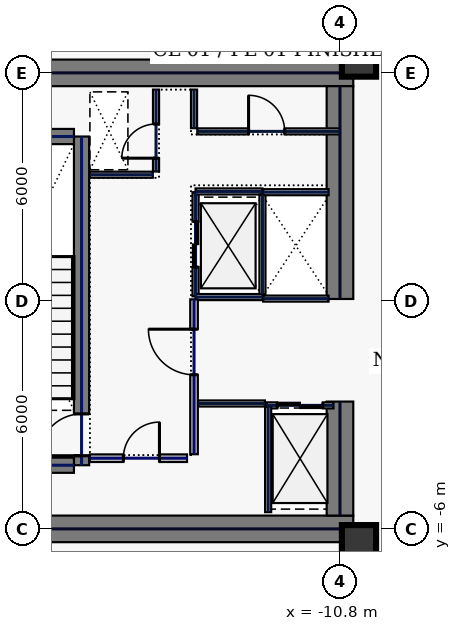
"""IFC4 building model, lengths in metres.
Left out: names, types, materials, properties, quantities, classifications, styles, units other than length and angle.
Written with IfcOpenShell. Run it as: python <this file> out.ifc"""

import sys

from ifc_helpers import new_model, si_unit, direction, frame, frame_2d, origin, origin_2d, place, context, subcontext, project, spatial, rectangle, hollow_rectangle, extrude, element, fill, save


model = new_model("IFC4")
c1 = context("Model", 3, precision=1e-05, world=origin(), true_north=direction((0.0, 1.0)))
c2 = subcontext(c1, "Body", "Model", "MODEL_VIEW")
j1 = project(units=[si_unit("LENGTHUNIT", "METRE"), si_unit("PLANEANGLEUNIT", "RADIAN")], contexts=[c1])
p1 = place(None, origin())
s1 = spatial("IfcSite", under=j1, at=p1, CompositionType="ELEMENT")
p2 = place(p1, origin())
s2 = spatial("IfcBuilding", under=s1, at=p2, CompositionType="ELEMENT")
p3 = place(p2, frame((0.0, 0.0, 160.2)))
s3 = spatial("IfcBuildingStorey", under=s2, at=p3, CompositionType="ELEMENT", Elevation=160.2)
for number, where, z_axis, x_axis in (
    (1, (-22.0, 6.0, 0.0), (0.0, 0.0, 1.0), (1.0, 0.0, 0.0)),
    (2, (-22.0, -6.0, 0.0), (0.0, 0.0, 1.0), (1.0, 0.0, 0.0)),
):
    element("IfcWall", number, at=place(p3, frame(where, z_axis=z_axis, x_axis=x_axis)), inside=s3, PredefinedType="SHEAR", context=c2, shape_type="SweptSolid", body=[
        extrude(rectangle(XDim=11.55, YDim=0.7, at=frame_2d((5.775, 0.0))), origin(), (0.0, 0.0, 1.0), 3.74),
    ])
p4 = place(p3, frame((-10.8, -5.65, 0.0), z_axis=(0.0, 0.0, 1.0), x_axis=(0.0, 1.0, 0.0)))
e3 = element("IfcWall", 3, at=p4, inside=s3, PredefinedType="SHEAR", context=c2, shape_type="SweptSolid", body=[
    extrude(rectangle(XDim=3.0, YDim=0.7, at=frame_2d((1.5, 0.0))), origin(), (0.0, 0.0, 1.0), 3.74),
])
p5 = place(p3, frame((-10.8, 0.05, 0.0), z_axis=(0.0, 0.0, 1.0), x_axis=(0.0, 1.0, 0.0)))
e4 = element("IfcWall", 4, at=p5, inside=s3, PredefinedType="SHEAR", context=c2, shape_type="SweptSolid", body=[
    extrude(rectangle(XDim=5.6, YDim=0.7, at=frame_2d((2.8, 0.0))), origin(), (0.0, 0.0, 1.0), 3.74),
])
p6 = place(p3, frame((-17.6, -4.325, 0.0), z_axis=(0.0, 0.0, 1.0), x_axis=(0.0, 1.0, 0.0)))
e5 = element("IfcWall", 5, at=p6, inside=s3, PredefinedType="SHEAR", context=c2, shape_type="SweptSolid", body=[
    extrude(rectangle(XDim=8.65, YDim=0.4, at=frame_2d((4.325, 0.0))), origin(), (0.0, 0.0, 1.0), 3.74),
])
p7 = place(p6, frame((0.25, 0.0, 0.0)))
e6 = element("IfcOpeningElement", 6, at=p7, cuts=e5, PredefinedType="OPENING", context=c2, shape_type="SweptSolid", body=[
    extrude(rectangle(XDim=1.1, YDim=2.2, at=frame_2d((0.55, 1.1))), frame((0.0, 0.21, 0.0), z_axis=(0.0, -1.0, 0.0), x_axis=(1.0, 0.0, 0.0)), (0.0, 0.0, 1.0), 0.42),
])
for number, where, z_axis, x_axis in (
    (7, (-21.2, -4.325, 0.0), (0.0, 0.0, 1.0), (1.0, 0.0, 0.0)),
    (8, (-21.2, 4.325, 0.0), (0.0, 0.0, 1.0), (1.0, 0.0, 0.0)),
):
    element("IfcWall", number, at=place(p3, frame(where, z_axis=z_axis, x_axis=x_axis)), inside=s3, PredefinedType="SHEAR", context=c2, shape_type="SweptSolid", body=[
        extrude(rectangle(XDim=3.4, YDim=0.4, at=frame_2d((1.7, 0.0))), origin(), (0.0, 0.0, 1.0), 3.74),
    ])
for number, where, z_axis, x_axis in (
    (9, (-10.3, -6.35, 0.0), (0.0, 0.0, 1.0), (1.0, 0.0, 0.0)),
    (10, (-10.3, 6.35, 0.0), (0.0, 0.0, 1.0), (1.0, 0.0, 0.0)),
):
    element("IfcColumn", number, at=place(p3, frame(where, z_axis=z_axis, x_axis=x_axis)), inside=s3, PredefinedType="COLUMN", context=c2, shape_type="SweptSolid", body=[
        extrude(hollow_rectangle(XDim=0.9, YDim=0.9, WallThickness=0.04, at=origin_2d()), origin(), (0.0, 0.0, 1.0), 3.74),
    ])
p8 = place(p3, frame((-14.6, 0.12, 0.0), z_axis=(0.0, 0.0, 1.0), x_axis=(0.0, 1.0, 0.0)))
e11 = element("IfcWall", 11, at=p8, inside=s3, PredefinedType="PARTITIONING", context=c2, shape_type="SweptSolid", body=[
    extrude(rectangle(XDim=2.74, YDim=0.16, at=frame_2d((1.37, 0.0))), origin(), (0.0, 0.0, 1.0), 3.74),
])
p9 = place(p8, frame((0.77, 0.0, 0.0)))
e12 = element("IfcOpeningElement", 12, at=p9, cuts=e11, PredefinedType="OPENING", context=c2, shape_type="SweptSolid", body=[
    extrude(rectangle(XDim=1.2, YDim=2.2, at=frame_2d((0.6, 1.1))), frame((0.0, 0.09, 0.0), z_axis=(0.0, -1.0, 0.0), x_axis=(1.0, 0.0, 0.0)), (0.0, 0.0, 1.0), 0.18),
])
for number, where, z_axis, x_axis in (
    (13, (-14.6, 0.1, 0.0), (0.0, 0.0, 1.0), (1.0, 0.0, 0.0)),
    (14, (-14.6, 2.88, 0.0), (0.0, 0.0, 1.0), (1.0, 0.0, 0.0)),
):
    element("IfcWall", number, at=place(p3, frame(where, z_axis=z_axis, x_axis=x_axis)), inside=s3, PredefinedType="PARTITIONING", context=c2, shape_type="SweptSolid", body=[
        extrude(rectangle(XDim=1.76, YDim=0.16, at=frame_2d((0.88, 0.0))), origin(), (0.0, 0.0, 1.0), 3.74),
    ])
p10 = place(p3, frame((-12.84, 0.18, 0.0), z_axis=(0.0, 0.0, 1.0), x_axis=(0.0, 1.0, 0.0)))
e15 = element("IfcWall", 15, at=p10, inside=s3, PredefinedType="PARTITIONING", context=c2, shape_type="SweptSolid", body=[
    extrude(rectangle(XDim=2.62, YDim=0.16, at=frame_2d((1.31, 0.0))), origin(), (0.0, 0.0, 1.0), 3.74),
])
p11 = place(p3, frame((-12.73, -2.75, 0.0), z_axis=(0.0, 0.0, 1.0), x_axis=(1.0, 0.0, 0.0)))
e16 = element("IfcWall", 16, at=p11, inside=s3, PredefinedType="PARTITIONING", context=c2, shape_type="SweptSolid", body=[
    extrude(rectangle(XDim=1.76, YDim=0.16, at=frame_2d((0.88, 0.0))), origin(), (0.0, 0.0, 1.0), 3.74),
])
p12 = place(p11, frame((0.28, 0.0, 0.0)))
e17 = element("IfcOpeningElement", 17, at=p12, cuts=e16, PredefinedType="OPENING", context=c2, shape_type="SweptSolid", body=[
    extrude(rectangle(XDim=1.2, YDim=2.2, at=frame_2d((0.6, 1.1))), frame((0.0, 0.09, 0.0), z_axis=(0.0, -1.0, 0.0), x_axis=(1.0, 0.0, 0.0)), (0.0, 0.0, 1.0), 0.18),
])
for number, where, z_axis, x_axis in (
    (18, (-12.82, 0.06, 0.0), (0.0, 0.0, 1.0), (1.0, 0.0, 0.0)),
    (19, (-12.82, 2.86, 0.0), (0.0, 0.0, 1.0), (1.0, 0.0, 0.0)),
):
    element("IfcWall", number, at=place(p3, frame(where, z_axis=z_axis, x_axis=x_axis)), inside=s3, PredefinedType="PARTITIONING", context=c2, shape_type="SweptSolid", body=[
        extrude(rectangle(XDim=1.72, YDim=0.16, at=frame_2d((0.86, 0.0))), origin(), (0.0, 0.0, 1.0), 3.74),
    ])
p13 = place(p3, frame((-15.64, 3.405, 0.0), z_axis=(0.0, 0.0, 1.0), x_axis=(0.0, 1.0, 0.0)))
e20 = element("IfcWall", 20, at=p13, inside=s3, PredefinedType="PARTITIONING", context=c2, shape_type="SweptSolid", body=[
    extrude(rectangle(XDim=2.155, YDim=0.16, at=frame_2d((1.078, 0.0))), origin(), (0.0, 0.0, 1.0), 3.74),
])
p14 = place(p13, frame((0.35, 0.0, 0.0)))
e21 = element("IfcOpeningElement", 21, at=p14, cuts=e20, PredefinedType="OPENING", context=c2, shape_type="SweptSolid", body=[
    extrude(rectangle(XDim=0.9, YDim=2.2, at=frame_2d((0.45, 1.1))), frame((0.0, 0.09, 0.0), z_axis=(0.0, -1.0, 0.0), x_axis=(1.0, 0.0, 0.0)), (0.0, 0.0, 1.0), 0.18),
])
p15 = place(p3, frame((-17.38, 3.32, 0.0), z_axis=(0.0, 0.0, 1.0), x_axis=(1.0, 0.0, 0.0)))
e22 = element("IfcWall", 22, at=p15, inside=s3, PredefinedType="PARTITIONING", context=c2, shape_type="SweptSolid", body=[
    extrude(rectangle(XDim=1.655, YDim=0.16, at=frame_2d((0.827, 0.0))), origin(), (0.0, 0.0, 1.0), 3.74),
])
p16 = place(p3, frame((-17.38, -4.14, 0.0), z_axis=(0.0, 0.0, 1.0), x_axis=(1.0, 0.0, 0.0)))
e23 = element("IfcWall", 23, at=p16, inside=s3, PredefinedType="SOLIDWALL", context=c2, shape_type="SweptSolid", body=[
    extrude(rectangle(XDim=2.555, YDim=0.2, at=frame_2d((1.277, 0.0))), origin(), (0.0, 0.0, 1.0), 3.74),
])
p17 = place(p16, frame((0.88, 0.0, 0.0)))
e24 = element("IfcOpeningElement", 24, at=p17, cuts=e23, PredefinedType="OPENING", context=c2, shape_type="SweptSolid", body=[
    extrude(rectangle(XDim=0.95, YDim=2.2, at=frame_2d((0.475, 1.1))), frame((0.0, 0.11, 0.0), z_axis=(0.0, -1.0, 0.0), x_axis=(1.0, 0.0, 0.0)), (0.0, 0.0, 1.0), 0.22),
])
p18 = place(p3, frame((-14.535, -2.7, 0.0), z_axis=(0.0, 0.0, 1.0), x_axis=(1.0, 0.0, 0.0)))
e25 = element("IfcWall", 25, at=p18, inside=s3, PredefinedType="PARTITIONING", context=c2, shape_type="SweptSolid", body=[
    extrude(rectangle(XDim=1.76, YDim=0.16, at=frame_2d((0.88, 0.0))), origin(), (0.0, 0.0, 1.0), 3.74),
])
p19 = place(p3, frame((-12.69, -5.56, 0.0), z_axis=(0.0, 0.0, 1.0), x_axis=(0.0, 1.0, 0.0)))
e26 = element("IfcWall", 26, at=p19, inside=s3, PredefinedType="PARTITIONING", context=c2, shape_type="SweptSolid", body=[
    extrude(rectangle(XDim=2.775, YDim=0.16, at=frame_2d((1.388, 0.0))), origin(), (0.0, 0.0, 1.0), 3.74),
])
p20 = place(p3, frame((-14.555, 4.46, 0.0), z_axis=(0.0, 0.0, 1.0), x_axis=(1.0, 0.0, 0.0)))
e27 = element("IfcWall", 27, at=p20, inside=s3, PredefinedType="PARTITIONING", context=c2, shape_type="SweptSolid", body=[
    extrude(rectangle(XDim=3.755, YDim=0.16, at=frame_2d((1.877, 0.0))), origin(), (0.0, 0.0, 1.0), 3.74),
])
p21 = place(p20, frame((1.35, 0.0, 0.0)))
e28 = element("IfcOpeningElement", 28, at=p21, cuts=e27, PredefinedType="OPENING", context=c2, shape_type="SweptSolid", body=[
    extrude(rectangle(XDim=0.95, YDim=2.2, at=frame_2d((0.475, 1.1))), frame((0.0, 0.09, 0.0), z_axis=(0.0, -1.0, 0.0), x_axis=(1.0, 0.0, 0.0)), (0.0, 0.0, 1.0), 0.18),
])
p22 = place(p3, frame((-14.64, 4.545, 0.0), z_axis=(0.0, 0.0, 1.0), x_axis=(0.0, 1.0, 0.0)))
e29 = element("IfcWall", 29, at=p22, inside=s3, PredefinedType="PARTITIONING", context=c2, shape_type="SweptSolid", body=[
    extrude(rectangle(XDim=1.015, YDim=0.16, at=frame_2d((0.508, 0.0))), origin(), (0.0, 0.0, 1.0), 3.74),
])
p23 = place(p3, frame((-14.64, -4.035, 0.0), z_axis=(0.0, 0.0, 1.0), x_axis=(0.0, 1.0, 0.0)))
e30 = element("IfcWall", 30, at=p23, inside=s3, PredefinedType="SOLIDWALL", context=c2, shape_type="SweptSolid", body=[
    extrude(rectangle(XDim=4.075, YDim=0.2, at=frame_2d((2.038, 0.0))), origin(), (0.0, 0.0, 1.0), 3.74),
])
p24 = place(p23, frame((2.09, 0.0, 0.0)))
e31 = element("IfcOpeningElement", 31, at=p24, cuts=e30, PredefinedType="OPENING", context=c2, shape_type="SweptSolid", body=[
    extrude(rectangle(XDim=1.2, YDim=2.2, at=frame_2d((0.6, 1.1))), frame((0.0, 0.11, 0.0), z_axis=(0.0, -1.0, 0.0), x_axis=(1.0, 0.0, 0.0)), (0.0, 0.0, 1.0), 0.22),
])
p25 = place(p3, frame((-10.63, -7.335, 0.0), z_axis=(0.0, 0.0, 1.0), x_axis=(0.0, 1.0, 0.0)))
e32 = element("IfcWall", 32, at=p25, inside=s3, PredefinedType="PARTITIONING", context=c2, shape_type="SweptSolid", body=[
    extrude(rectangle(XDim=0.915, YDim=0.16, at=frame_2d((0.458, 0.0))), origin(), (0.0, 0.0, 1.0), 1.535),
])
p26 = place(p3, frame((-10.63, 6.42, 0.0), z_axis=(0.0, 0.0, 1.0), x_axis=(0.0, 1.0, 0.0)))
e33 = element("IfcWall", 33, at=p26, inside=s3, PredefinedType="PARTITIONING", context=c2, shape_type="SweptSolid", body=[
    extrude(rectangle(XDim=1.015, YDim=0.16, at=frame_2d((0.508, 0.0))), origin(), (0.0, 0.0, 1.0), 3.74),
])
p27 = place(p7, origin())
e34 = element("IfcDoor", 34, at=p27, inside=s3, OperationType="SINGLE_SWING_LEFT", PredefinedType="DOOR", context=c2, shape_type="SweptSolid", body=[
    extrude(rectangle(XDim=1.1, YDim=2.2, at=frame_2d((0.55, 1.1))), frame((0.0, 0.025, 0.0), z_axis=(0.0, -1.0, 0.0), x_axis=(1.0, 0.0, 0.0)), (0.0, 0.0, 1.0), 0.05),
])
fill(e6, e34)
p28 = place(p9, origin())
e35 = element("IfcDoor", 35, at=p28, inside=s3, OperationType="SLIDING_TO_LEFT", PredefinedType="DOOR", context=c2, shape_type="SweptSolid", body=[
    extrude(rectangle(XDim=1.2, YDim=2.2, at=frame_2d((0.6, 1.1))), frame((0.0, 0.025, 0.0), z_axis=(0.0, -1.0, 0.0), x_axis=(1.0, 0.0, 0.0)), (0.0, 0.0, 1.0), 0.05),
])
fill(e12, e35)
p29 = place(p12, origin())
e36 = element("IfcDoor", 36, at=p29, inside=s3, OperationType="SLIDING_TO_LEFT", PredefinedType="DOOR", context=c2, shape_type="SweptSolid", body=[
    extrude(rectangle(XDim=1.2, YDim=2.2, at=frame_2d((0.6, 1.1))), frame((0.0, 0.025, 0.0), z_axis=(0.0, -1.0, 0.0), x_axis=(1.0, 0.0, 0.0)), (0.0, 0.0, 1.0), 0.05),
])
fill(e17, e36)
p30 = place(p14, origin())
e37 = element("IfcDoor", 37, at=p30, inside=s3, OperationType="SINGLE_SWING_LEFT", PredefinedType="DOOR", context=c2, shape_type="SweptSolid", body=[
    extrude(rectangle(XDim=0.9, YDim=2.2, at=frame_2d((0.45, 1.1))), frame((0.0, 0.025, 0.0), z_axis=(0.0, -1.0, 0.0), x_axis=(1.0, 0.0, 0.0)), (0.0, 0.0, 1.0), 0.05),
])
fill(e21, e37)
p31 = place(p17, origin())
e38 = element("IfcDoor", 38, at=p31, inside=s3, OperationType="SINGLE_SWING_RIGHT", PredefinedType="DOOR", context=c2, shape_type="SweptSolid", body=[
    extrude(rectangle(XDim=0.95, YDim=2.2, at=frame_2d((0.475, 1.1))), frame((0.0, 0.025, 0.0), z_axis=(0.0, -1.0, 0.0), x_axis=(1.0, 0.0, 0.0)), (0.0, 0.0, 1.0), 0.05),
])
fill(e24, e38)
p32 = place(p21, origin())
e39 = element("IfcDoor", 39, at=p32, inside=s3, OperationType="SINGLE_SWING_LEFT", PredefinedType="DOOR", context=c2, shape_type="SweptSolid", body=[
    extrude(rectangle(XDim=0.95, YDim=2.2, at=frame_2d((0.475, 1.1))), frame((0.0, 0.025, 0.0), z_axis=(0.0, -1.0, 0.0), x_axis=(1.0, 0.0, 0.0)), (0.0, 0.0, 1.0), 0.05),
])
fill(e28, e39)
p33 = place(p24, origin())
e40 = element("IfcDoor", 40, at=p33, inside=s3, OperationType="SINGLE_SWING_RIGHT", PredefinedType="DOOR", context=c2, shape_type="SweptSolid", body=[
    extrude(rectangle(XDim=1.2, YDim=2.2, at=frame_2d((0.6, 1.1))), frame((0.0, 0.025, 0.0), z_axis=(0.0, -1.0, 0.0), x_axis=(1.0, 0.0, 0.0)), (0.0, 0.0, 1.0), 0.05),
])
fill(e31, e40)
save(model, sys.argv[1])
